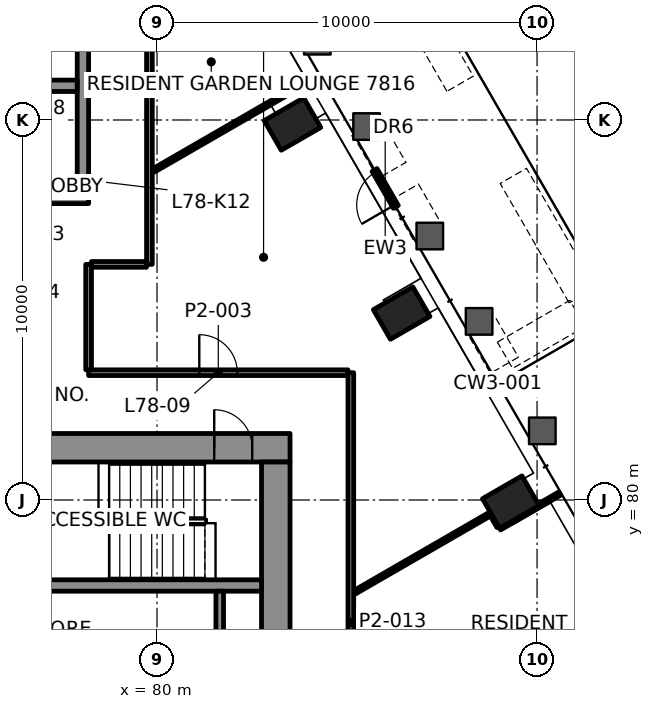
"""IFC4 building model, lengths in metres.
Left out: names, types, materials, properties, quantities, classifications, styles, units other than length and angle.
Written with IfcOpenShell. Run it as: python <this file> out.ifc"""

import sys

from ifc_helpers import new_model, si_unit, direction, frame, frame_2d, origin, origin_2d, place, context, subcontext, project, spatial, rectangle, hollow_rectangle, extrude, element, fill, save


model = new_model("IFC4")
c1 = context("Model", 3, precision=1e-05, world=origin(), true_north=direction((0.0, 1.0)))
c2 = subcontext(c1, "Body", "Model", "MODEL_VIEW")
j1 = project(units=[si_unit("LENGTHUNIT", "METRE"), si_unit("PLANEANGLEUNIT", "RADIAN")], contexts=[c1])
p1 = place(None, origin())
s1 = spatial("IfcSite", under=j1, at=p1, CompositionType="ELEMENT")
p2 = place(p1, origin())
s2 = spatial("IfcBuilding", under=s1, at=p2, CompositionType="ELEMENT")
p3 = place(p2, frame((0.0, 0.0, 319.6)))
s3 = spatial("IfcBuildingStorey", under=s2, at=p3, CompositionType="ELEMENT", Elevation=319.6)
for number, where, z_axis, x_axis in (
    (1, (89.309, 79.945, -0.0), (0.0, 0.0, 1.0), (-0.5, 0.866, 0.0)),
    (2, (86.437, 84.919, -0.0), (0.0, 0.0, 1.0), (-0.5, 0.866, 0.0)),
    (3, (83.565, 89.894, -0.0), (0.0, 0.0, 1.0), (-0.5, 0.866, 0.0)),
):
    element("IfcColumn", number, at=place(p3, frame(where, z_axis=z_axis, x_axis=x_axis)), inside=s3, PredefinedType="COLUMN", context=c2, shape_type="SweptSolid", body=[
        extrude(hollow_rectangle(XDim=0.9, YDim=1.2, WallThickness=0.06, at=origin_2d()), origin(), (0.0, 0.0, 1.0), 3.5),
    ])
p4 = place(p3, frame((66.5, 81.375, 0.0), z_axis=(0.0, 0.0, 1.0), x_axis=(1.0, 0.0, 0.0)))
e4 = element("IfcWall", 4, at=p4, inside=s3, PredefinedType="SHEAR", context=c2, shape_type="SweptSolid", body=[
    extrude(rectangle(XDim=17.0, YDim=0.75, at=frame_2d((8.5, 0.0))), origin(), (0.0, 0.0, 1.0), 3.3),
])
p5 = place(p4, frame((1.195, 0.0, 0.0)))
e5 = element("IfcOpeningElement", 5, at=p5, cuts=e4, PredefinedType="OPENING", context=c2, shape_type="SweptSolid", body=[
    extrude(rectangle(XDim=1.0, YDim=2.1, at=frame_2d((0.5, 1.05))), frame((0.0, 0.385, 0.0), z_axis=(0.0, -1.0, 0.0), x_axis=(1.0, 0.0, 0.0)), (0.0, 0.0, 1.0), 0.77),
])
p6 = place(p4, frame((15.005, 0.0, 0.0)))
e6 = element("IfcOpeningElement", 6, at=p6, cuts=e4, PredefinedType="OPENING", context=c2, shape_type="SweptSolid", body=[
    extrude(rectangle(XDim=1.0, YDim=2.1, at=frame_2d((0.5, 1.05))), frame((0.0, 0.385, 0.0), z_axis=(0.0, -1.0, 0.0), x_axis=(1.0, 0.0, 0.0)), (0.0, 0.0, 1.0), 0.77),
])
p7 = place(p4, frame((8.15, 0.0, 0.0)))
e7 = element("IfcOpeningElement", 7, at=p7, cuts=e4, PredefinedType="OPENING", context=c2, shape_type="SweptSolid", body=[
    extrude(rectangle(XDim=0.9, YDim=2.1, at=frame_2d((0.45, 1.05))), frame((0.0, 0.385, 0.0), z_axis=(0.0, -1.0, 0.0), x_axis=(1.0, 0.0, 0.0)), (0.0, 0.0, 1.0), 0.77),
])
p8 = place(p3, frame((83.125, 69.0, 0.0), z_axis=(0.0, 0.0, 1.0), x_axis=(0.0, 1.0, 0.0)))
e8 = element("IfcWall", 8, at=p8, inside=s3, PredefinedType="SHEAR", context=c2, shape_type="SweptSolid", body=[
    extrude(rectangle(XDim=12.0, YDim=0.75, at=frame_2d((6.0, 0.0))), origin(), (0.0, 0.0, 1.0), 3.3),
])
p9 = place(p8, frame((3.4, 0.0, 0.0)))
e9 = element("IfcOpeningElement", 9, at=p9, cuts=e8, PredefinedType="OPENING", context=c2, shape_type="SweptSolid", body=[
    extrude(rectangle(XDim=1.8, YDim=2.1, at=frame_2d((0.9, 1.05))), frame((0.0, 0.385, 0.0), z_axis=(0.0, -1.0, 0.0), x_axis=(1.0, 0.0, 0.0)), (0.0, 0.0, 1.0), 0.77),
])
p10 = place(p3, frame((67.25, 77.75, 0.0), z_axis=(0.0, 0.0, 1.0), x_axis=(1.0, 0.0, 0.0)))
e10 = element("IfcWall", 10, at=p10, inside=s3, PredefinedType="SHEAR", context=c2, shape_type="SweptSolid", body=[
    extrude(rectangle(XDim=15.5, YDim=0.3, at=frame_2d((7.75, 0.0))), origin(), (0.0, 0.0, 1.0), 3.3),
])
p11 = place(p10, frame((0.445, 0.0, 0.0)))
e11 = element("IfcOpeningElement", 11, at=p11, cuts=e10, PredefinedType="OPENING", context=c2, shape_type="SweptSolid", body=[
    extrude(rectangle(XDim=1.0, YDim=2.1, at=frame_2d((0.5, 1.05))), frame((0.0, 0.16, 0.0), z_axis=(0.0, -1.0, 0.0), x_axis=(1.0, 0.0, 0.0)), (0.0, 0.0, 1.0), 0.32),
])
p12 = place(p3, frame((71.8, 87.95, 0.0), z_axis=(0.0, 0.0, 1.0), x_axis=(1.0, 0.0, 0.0)))
e12 = element("IfcWall", 12, at=p12, inside=s3, PredefinedType="SHEAR", context=c2, shape_type="SweptSolid", body=[
    extrude(rectangle(XDim=6.4, YDim=0.3, at=frame_2d((3.2, 0.0))), origin(), (0.0, 0.0, 1.0), 3.3),
])
p13 = place(p12, frame((1.325, 0.0, 0.0)))
e13 = element("IfcOpeningElement", 13, at=p13, cuts=e12, PredefinedType="OPENING", context=c2, shape_type="SweptSolid", body=[
    extrude(rectangle(XDim=1.0, YDim=2.1, at=frame_2d((0.5, 1.05))), frame((0.0, 0.16, 0.0), z_axis=(0.0, -1.0, 0.0), x_axis=(1.0, 0.0, 0.0)), (0.0, 0.0, 1.0), 0.32),
])
p14 = place(p12, frame((4.125, 0.0, 0.0)))
e14 = element("IfcOpeningElement", 14, at=p14, cuts=e12, PredefinedType="OPENING", context=c2, shape_type="SweptSolid", body=[
    extrude(rectangle(XDim=1.2, YDim=2.1, at=frame_2d((0.6, 1.05))), frame((0.0, 0.16, 0.0), z_axis=(0.0, -1.0, 0.0), x_axis=(1.0, 0.0, 0.0)), (0.0, 0.0, 1.0), 0.32),
])
p15 = place(p3, frame((78.05, 88.1, 0.0), z_axis=(0.0, 0.0, 1.0), x_axis=(0.0, 1.0, 0.0)))
e15 = element("IfcWall", 15, at=p15, inside=s3, PredefinedType="SHEAR", context=c2, shape_type="SweptSolid", body=[
    extrude(rectangle(XDim=6.2, YDim=0.3, at=frame_2d((3.1, 0.0))), origin(), (0.0, 0.0, 1.0), 3.3),
])
p16 = place(p3, frame((75.3, 90.9, 0.0), z_axis=(0.0, 0.0, 1.0), x_axis=(1.0, 0.0, 0.0)))
e16 = element("IfcWall", 16, at=p16, inside=s3, PredefinedType="SHEAR", context=c2, shape_type="SweptSolid", body=[
    extrude(rectangle(XDim=2.6, YDim=0.3, at=frame_2d((1.3, 0.0))), origin(), (0.0, 0.0, 1.0), 3.3),
])
p17 = place(p16, frame((0.675, 0.0, 0.0)))
e17 = element("IfcOpeningElement", 17, at=p17, cuts=e16, PredefinedType="OPENING", context=c2, shape_type="SweptSolid", body=[
    extrude(rectangle(XDim=1.1, YDim=2.1, at=frame_2d((0.55, 1.05))), frame((0.0, 0.16, 0.0), z_axis=(0.0, -1.0, 0.0), x_axis=(1.0, 0.0, 0.0)), (0.0, 0.0, 1.0), 0.32),
])
p18 = place(p3, frame((78.2, 83.35, 0.0), z_axis=(0.0, 0.0, 1.0), x_axis=(1.0, 0.0, 0.0)))
e18 = element("IfcWall", 18, at=p18, inside=s3, PredefinedType="PARTITIONING", context=c2, shape_type="SweptSolid", body=[
    extrude(rectangle(XDim=6.824, YDim=0.15, at=frame_2d((3.412, 0.0))), origin(), (0.0, 0.0, 1.0), 2.7),
])
p19 = place(p18, frame((2.912, 0.0, 0.0)))
e19 = element("IfcOpeningElement", 19, at=p19, cuts=e18, PredefinedType="OPENING", context=c2, shape_type="SweptSolid", body=[
    extrude(rectangle(XDim=1.0, YDim=2.1, at=frame_2d((0.5, 1.05))), frame((0.0, 0.085, 0.0), z_axis=(0.0, -1.0, 0.0), x_axis=(1.0, 0.0, 0.0)), (0.0, 0.0, 1.0), 0.17),
])
p20 = place(p3, frame((78.275, 86.2, 0.0), z_axis=(0.0, 0.0, 1.0), x_axis=(1.0, 0.0, 0.0)))
e20 = element("IfcWall", 20, at=p20, inside=s3, PredefinedType="PARTITIONING", context=c2, shape_type="SweptSolid", body=[
    extrude(rectangle(XDim=1.449, YDim=0.15, at=frame_2d((0.725, 0.0))), origin(), (0.0, 0.0, 1.0), 2.7),
])
p21 = place(p3, frame((89.014, 79.255, 0.0), z_axis=(0.0, 0.0, 1.0), x_axis=(0.866038107287, 0.499977996243, 0.0)))
e21 = element("IfcWall", 21, at=p21, inside=s3, PredefinedType="PARTITIONING", context=c2, shape_type="SweptSolid", body=[
    extrude(rectangle(XDim=1.819, YDim=0.1, at=frame_2d((0.91, 0.0))), origin(), (0.0, 0.0, 1.0), 2.688),
])
p22 = place(p3, frame((85.201, 77.573, 0.0), z_axis=(0.0, 0.0, 1.0), x_axis=(0.866029543084, 0.499992830454, 0.0)))
e22 = element("IfcWall", 22, at=p22, inside=s3, PredefinedType="PARTITIONING", context=c2, shape_type="SweptSolid", body=[
    extrude(rectangle(XDim=4.143, YDim=0.1, at=frame_2d((2.071, 0.0))), origin(), (0.0, 0.0, 1.0), 2.7),
])
p23 = place(p3, frame((79.901, 88.668, 0.0), z_axis=(0.0, 0.0, 1.0), x_axis=(0.866025588148, 0.499999680672, 0.0)))
e23 = element("IfcWall", 23, at=p23, inside=s3, PredefinedType="PARTITIONING", context=c2, shape_type="SweptSolid", body=[
    extrude(rectangle(XDim=5.006, YDim=0.1, at=frame_2d((2.503, 0.0))), origin(), (0.0, 0.0, 1.0), 2.7),
])
p24 = place(p3, frame((85.1, 83.349, 0.0), z_axis=(0.0, 0.0, 1.0), x_axis=(0.0, -1.0, 0.0)))
e24 = element("IfcWall", 24, at=p24, inside=s3, PredefinedType="PARTITIONING", context=c2, shape_type="SweptSolid", body=[
    extrude(rectangle(XDim=13.141, YDim=0.15, at=frame_2d((6.571, 0.0))), origin(), (0.0, 0.0, 1.0), 2.7),
])
p25 = place(p24, frame((8.886, 0.0, 0.0)))
e25 = element("IfcOpeningElement", 25, at=p25, cuts=e24, PredefinedType="OPENING", context=c2, shape_type="SweptSolid", body=[
    extrude(rectangle(XDim=1.0, YDim=2.1, at=frame_2d((0.5, 1.05))), frame((0.0, 0.085, 0.0), z_axis=(0.0, -1.0, 0.0), x_axis=(1.0, 0.0, 0.0)), (0.0, 0.0, 1.0), 0.17),
])
p26 = place(p3, frame((79.8, 86.2, 0.0), z_axis=(0.0, 0.0, 1.0), x_axis=(0.0, 1.0, 0.0)))
e26 = element("IfcWall", 26, at=p26, inside=s3, PredefinedType="PARTITIONING", context=c2, shape_type="SweptSolid", body=[
    extrude(rectangle(XDim=9.999, YDim=0.15, at=frame_2d((5.0, 0.0))), origin(), (0.0, 0.0, 1.0), 2.7),
])
p27 = place(p3, frame((78.2, 83.425, 0.0), z_axis=(0.0, 0.0, 1.0), x_axis=(0.0, 1.0, 0.0)))
e27 = element("IfcWall", 27, at=p27, inside=s3, PredefinedType="PARTITIONING", context=c2, shape_type="SweptSolid", body=[
    extrude(rectangle(XDim=2.775, YDim=0.15, at=frame_2d((1.387, 0.0))), origin(), (0.0, 0.0, 1.0), 2.7),
])
p28 = place(p3, frame((88.989, 79.299, 0.0), z_axis=(0.0, 0.0, 1.0), x_axis=(-0.500126092966, 0.865952591736, 0.0)))
e28 = element("IfcWall", 28, at=p28, inside=s3, PredefinedType="PARTITIONING", context=c2, shape_type="SweptSolid", body=[
    extrude(rectangle(XDim=0.349, YDim=0.1, at=frame_2d((0.175, 0.0))), origin(), (0.0, 0.0, 1.0), 2.7),
])
p29 = place(p3, frame((89.156, 83.808, 0.0), z_axis=(0.0, 0.0, 1.0), x_axis=(0.86605622881, 0.499946605688, 0.0)))
e29 = element("IfcWall", 29, at=p29, inside=s3, PredefinedType="SOLIDWALL", context=c2, shape_type="SweptSolid", body=[
    extrude(rectangle(XDim=2.2, YDim=0.8, at=frame_2d((1.1, 0.0))), origin(), (0.0, 0.0, 1.0), 0.9),
])
p30 = place(p3, frame((91.19, 85.386, 0.0), z_axis=(0.0, 0.0, 1.0), x_axis=(-0.499974868256, 0.866039913117, 0.0)))
e30 = element("IfcWall", 30, at=p30, inside=s3, PredefinedType="SOLIDWALL", context=c2, shape_type="SweptSolid", body=[
    extrude(rectangle(XDim=3.628, YDim=0.8, at=frame_2d((1.814, 0.0))), origin(), (0.0, 0.0, 1.0), 0.9),
])
p31 = place(p3, frame((87.976, 90.953, 0.0), z_axis=(0.0, 0.0, 1.0), x_axis=(-0.499998569178, 0.866026229868, 0.0)))
e31 = element("IfcWall", 31, at=p31, inside=s3, PredefinedType="SOLIDWALL", context=c2, shape_type="SweptSolid", body=[
    extrude(rectangle(XDim=14.185, YDim=0.8, at=frame_2d((7.093, 0.0))), origin(), (0.0, 0.0, 1.0), 0.9),
])
p32 = place(p3, frame((81.65, 74.95, 0.0), z_axis=(0.0, 0.0, 1.0), x_axis=(0.0, 1.0, 0.0)))
e32 = element("IfcWall", 32, at=p32, inside=s3, PredefinedType="PARTITIONING", context=c2, shape_type="SweptSolid", body=[
    extrude(rectangle(XDim=2.65, YDim=0.2, at=frame_2d((1.325, 0.0))), origin(), (0.0, 0.0, 1.0), 3.3),
])
p33 = place(p19, origin())
e33 = element("IfcDoor", 33, at=p33, inside=s3, OperationType="SINGLE_SWING_RIGHT", PredefinedType="DOOR", context=c2, shape_type="SweptSolid", body=[
    extrude(rectangle(XDim=1.0, YDim=2.1, at=frame_2d((0.5, 1.05))), frame((0.0, 0.025, 0.0), z_axis=(0.0, -1.0, 0.0), x_axis=(1.0, 0.0, 0.0)), (0.0, 0.0, 1.0), 0.05),
])
fill(e19, e33)
p34 = place(p3, frame((86.284, 87.713, 0.0), z_axis=(0.0, 0.0, 1.0), x_axis=(-0.499867132655, 0.866102101193, 0.0)))
p35 = place(p34, frame((0.06, 0.0, 0.0)))
p36 = place(p35, origin())
e34 = element("IfcDoor", 34, at=p36, inside=s3, OperationType="SINGLE_SWING_LEFT", PredefinedType="DOOR", context=c2, shape_type="SweptSolid", body=[
    extrude(rectangle(XDim=1.0, YDim=2.1, at=frame_2d((0.5, 1.05))), frame((0.0, 0.025, 0.0), z_axis=(0.0, -1.0, 0.0), x_axis=(1.0, 0.0, 0.0)), (0.0, 0.0, 1.0), 0.05),
])
p37 = place(p6, origin())
e35 = element("IfcDoor", 35, at=p37, inside=s3, OperationType="SINGLE_SWING_LEFT", PredefinedType="DOOR", context=c2, shape_type="SweptSolid", body=[
    extrude(rectangle(XDim=1.0, YDim=2.1, at=frame_2d((0.5, 1.05))), frame((0.0, 0.095, 0.0), z_axis=(0.0, -1.0, 0.0), x_axis=(1.0, 0.0, 0.0)), (0.0, 0.0, 1.0), 0.19),
])
fill(e6, e35)
save(model, sys.argv[1])
